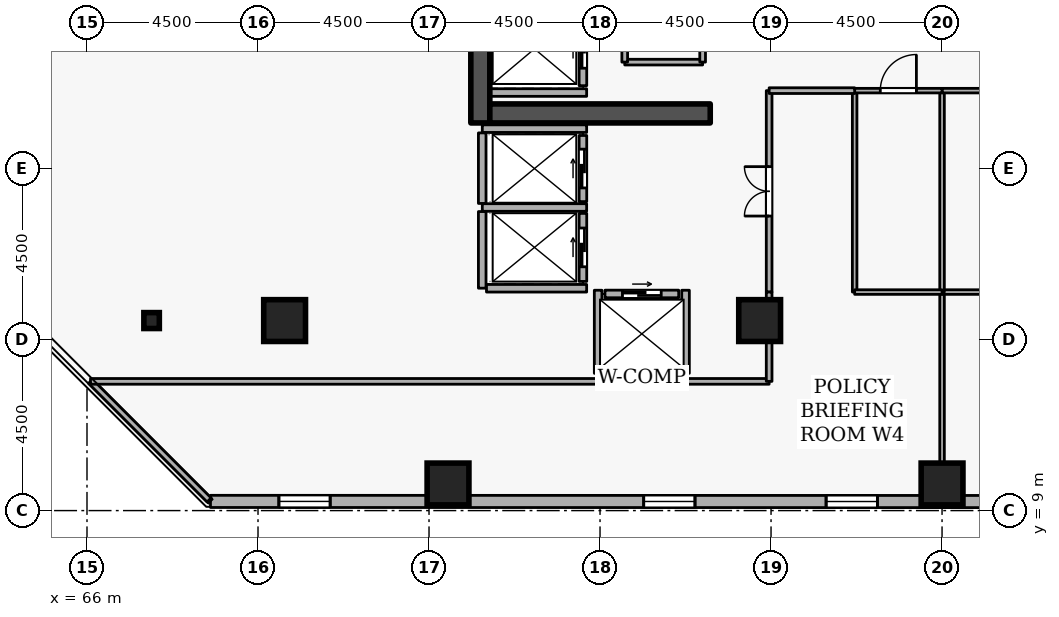
"""IFC4 building model, lengths in metres.
Left out: names, types, materials, properties, quantities, classifications, styles, units other than length and angle.
Written with IfcOpenShell. Run it as: python <this file> out.ifc"""

import sys

from ifc_helpers import new_model, si_unit, direction, frame, frame_2d, origin, origin_2d, place, context, subcontext, project, spatial, rectangle, i_section, extrude, element, fill, save


model = new_model("IFC4")
c1 = context("Model", 3, precision=1e-05, world=origin(), true_north=direction((0.0, 1.0)))
c2 = subcontext(c1, "Body", "Model", "MODEL_VIEW")
j1 = project(units=[si_unit("LENGTHUNIT", "METRE"), si_unit("PLANEANGLEUNIT", "RADIAN")], contexts=[c1])
p1 = place(None, origin())
s1 = spatial("IfcSite", under=j1, at=p1, CompositionType="ELEMENT")
p2 = place(p1, origin())
s2 = spatial("IfcBuilding", under=s1, at=p2, CompositionType="ELEMENT")
p3 = place(p2, frame((0.0, 0.0, 196.5)))
s3 = spatial("IfcBuildingStorey", under=s2, at=p3, CompositionType="ELEMENT", Elevation=196.5)
p4 = place(p3, frame((76.35, 19.2, 0.0), z_axis=(0.0, 0.0, 1.0), x_axis=(0.0, 1.0, 0.0)))
e1 = element("IfcWall", 1, at=p4, inside=s3, PredefinedType="SHEAR", context=c2, shape_type="SweptSolid", body=[
    extrude(rectangle(XDim=15.6, YDim=0.5, at=frame_2d((7.8, 0.0))), origin(), (0.0, 0.0, 1.0), 3.6),
])
p5 = place(p3, frame((76.6, 19.45, 0.0), z_axis=(0.0, 0.0, 1.0), x_axis=(1.0, 0.0, 0.0)))
e2 = element("IfcWall", 2, at=p5, inside=s3, PredefinedType="SHEAR", context=c2, shape_type="SweptSolid", body=[
    extrude(rectangle(XDim=5.8, YDim=0.5, at=frame_2d((2.9, 0.0))), origin(), (0.0, 0.0, 1.0), 3.6),
])
for number, where, z_axis, x_axis in (
    (3, (71.2, 14.0, 0.0), (0.0, 0.0, 1.0), (1.0, 0.0, 0.0)),
    (4, (88.5, 9.7, 0.0), (0.0, 0.0, 1.0), (1.0, 0.0, 0.0)),
    (5, (75.5, 9.7, 0.0), (0.0, 0.0, 1.0), (1.0, 0.0, 0.0)),
    (6, (83.7, 14.0, 0.0), (0.0, 0.0, 1.0), (1.0, 0.0, 0.0)),
):
    element("IfcColumn", number, at=place(p3, frame(where, z_axis=z_axis, x_axis=x_axis)), inside=s3, PredefinedType="COLUMN", context=c2, shape_type="SweptSolid", body=[
        extrude(rectangle(XDim=1.1, YDim=1.1, at=origin_2d()), origin(), (0.0, 0.0, 1.0), 3.6),
    ])
p6 = place(p3, frame((67.7, 14.0, 0.0), z_axis=(0.0, 0.0, 1.0), x_axis=(1.0, 0.0, 0.0)))
e7 = element("IfcColumn", 7, at=p6, inside=s3, PredefinedType="COLUMN", context=c2, shape_type="SweptSolid", body=[
    extrude(i_section(OverallWidth=0.407, OverallDepth=0.419, WebThickness=0.031, FlangeThickness=0.049, FilletRadius=0.015, at=origin_2d()), origin(), (0.0, 0.0, 1.0), 3.6),
])
p7 = place(p3, frame((69.249, 9.242, 0.0), z_axis=(0.0, 0.0, 1.0), x_axis=(0.999999983007, -0.000184351399, 0.0)))
e8 = element("IfcWall", 8, at=p7, inside=s3, PredefinedType="STANDARD", context=c2, shape_type="SweptSolid", body=[
    extrude(rectangle(XDim=34.432, YDim=0.32, at=frame_2d((17.216, 0.0))), origin(), (0.0, 0.0, 1.0), 2.22),
])
p8 = place(p7, frame((1.8, 0.0, 0.72)))
e9 = element("IfcOpeningElement", 9, at=p8, cuts=e8, PredefinedType="OPENING", context=c2, shape_type="SweptSolid", body=[
    extrude(rectangle(XDim=1.35, YDim=1.05, at=frame_2d((0.675, 0.525))), frame((0.0, 0.17, 0.0), z_axis=(0.0, -1.0, 0.0), x_axis=(1.0, 0.0, 0.0)), (0.0, 0.0, 1.0), 0.34),
])
p9 = place(p7, frame((11.4, 0.0, 0.72)))
e10 = element("IfcOpeningElement", 10, at=p9, cuts=e8, PredefinedType="OPENING", context=c2, shape_type="SweptSolid", body=[
    extrude(rectangle(XDim=1.35, YDim=1.05, at=frame_2d((0.675, 0.525))), frame((0.0, 0.17, 0.0), z_axis=(0.0, -1.0, 0.0), x_axis=(1.0, 0.0, 0.0)), (0.0, 0.0, 1.0), 0.34),
])
p10 = place(p7, frame((16.2, 0.0, 0.72)))
e11 = element("IfcOpeningElement", 11, at=p10, cuts=e8, PredefinedType="OPENING", context=c2, shape_type="SweptSolid", body=[
    extrude(rectangle(XDim=1.35, YDim=1.05, at=frame_2d((0.675, 0.525))), frame((0.0, 0.17, 0.0), z_axis=(0.0, -1.0, 0.0), x_axis=(1.0, 0.0, 0.0)), (0.0, 0.0, 1.0), 0.34),
])
p11 = place(p7, frame((21.0, 0.0, 0.72)))
e12 = element("IfcOpeningElement", 12, at=p11, cuts=e8, PredefinedType="OPENING", context=c2, shape_type="SweptSolid", body=[
    extrude(rectangle(XDim=1.35, YDim=1.05, at=frame_2d((0.675, 0.525))), frame((0.0, 0.17, 0.0), z_axis=(0.0, -1.0, 0.0), x_axis=(1.0, 0.0, 0.0)), (0.0, 0.0, 1.0), 0.34),
])
p12 = place(p7, frame((25.8, 0.0, 0.72)))
e13 = element("IfcOpeningElement", 13, at=p12, cuts=e8, PredefinedType="OPENING", context=c2, shape_type="SweptSolid", body=[
    extrude(rectangle(XDim=1.35, YDim=1.05, at=frame_2d((0.675, 0.525))), frame((0.0, 0.17, 0.0), z_axis=(0.0, -1.0, 0.0), x_axis=(1.0, 0.0, 0.0)), (0.0, 0.0, 1.0), 0.34),
])
p13 = place(p3, frame((79.05, 20.18, 0.0), z_axis=(0.0, 0.0, 1.0), x_axis=(0.0, 1.0, 0.0)))
e14 = element("IfcWall", 14, at=p13, inside=s3, PredefinedType="STANDARD", context=c2, shape_type="SweptSolid", body=[
    extrude(rectangle(XDim=1.94, YDim=0.2, at=frame_2d((0.97, 0.0))), origin(), (0.0, 0.0, 1.0), 3.32),
])
p14 = place(p13, frame((0.46, 0.0, 0.0)))
e15 = element("IfcOpeningElement", 15, at=p14, cuts=e14, PredefinedType="OPENING", context=c2, shape_type="SweptSolid", body=[
    extrude(rectangle(XDim=1.02, YDim=2.06, at=frame_2d((0.51, 1.03))), frame((0.0, 0.11, 0.0), z_axis=(0.0, -1.0, 0.0), x_axis=(1.0, 0.0, 0.0)), (0.0, 0.0, 1.0), 0.22),
])
p15 = place(p3, frame((79.05, 17.13, 0.0), z_axis=(0.0, 0.0, 1.0), x_axis=(0.0, 1.0, 0.0)))
e16 = element("IfcWall", 16, at=p15, inside=s3, PredefinedType="STANDARD", context=c2, shape_type="SweptSolid", body=[
    extrude(rectangle(XDim=1.74, YDim=0.2, at=frame_2d((0.87, 0.0))), origin(), (0.0, 0.0, 1.0), 3.32),
])
p16 = place(p15, frame((0.36, 0.0, 0.0)))
e17 = element("IfcOpeningElement", 17, at=p16, cuts=e16, PredefinedType="OPENING", context=c2, shape_type="SweptSolid", body=[
    extrude(rectangle(XDim=1.02, YDim=2.06, at=frame_2d((0.51, 1.03))), frame((0.0, 0.11, 0.0), z_axis=(0.0, -1.0, 0.0), x_axis=(1.0, 0.0, 0.0)), (0.0, 0.0, 1.0), 0.22),
])
p17 = place(p3, frame((79.05, 15.03, 0.0), z_axis=(0.0, 0.0, 1.0), x_axis=(0.0, 1.0, 0.0)))
e18 = element("IfcWall", 18, at=p17, inside=s3, PredefinedType="STANDARD", context=c2, shape_type="SweptSolid", body=[
    extrude(rectangle(XDim=1.79, YDim=0.2, at=frame_2d((0.895, 0.0))), origin(), (0.0, 0.0, 1.0), 3.32),
])
p18 = place(p17, frame((0.385, 0.0, 0.0)))
e19 = element("IfcOpeningElement", 19, at=p18, cuts=e18, PredefinedType="OPENING", context=c2, shape_type="SweptSolid", body=[
    extrude(rectangle(XDim=1.02, YDim=2.06, at=frame_2d((0.51, 1.03))), frame((0.0, 0.11, 0.0), z_axis=(0.0, -1.0, 0.0), x_axis=(1.0, 0.0, 0.0)), (0.0, 0.0, 1.0), 0.22),
])
p19 = place(p3, frame((79.63, 14.7, 0.0), z_axis=(0.0, 0.0, 1.0), x_axis=(1.0, 0.0, 0.0)))
e20 = element("IfcWall", 20, at=p19, inside=s3, PredefinedType="STANDARD", context=c2, shape_type="SweptSolid", body=[
    extrude(rectangle(XDim=1.94, YDim=0.2, at=frame_2d((0.97, 0.0))), origin(), (0.0, 0.0, 1.0), 3.32),
])
p20 = place(p19, frame((0.46, 0.0, 0.0)))
e21 = element("IfcOpeningElement", 21, at=p20, cuts=e20, PredefinedType="OPENING", context=c2, shape_type="SweptSolid", body=[
    extrude(rectangle(XDim=1.02, YDim=2.06, at=frame_2d((0.51, 1.03))), frame((0.0, 0.11, 0.0), z_axis=(0.0, -1.0, 0.0), x_axis=(1.0, 0.0, 0.0)), (0.0, 0.0, 1.0), 0.22),
])
p21 = place(p3, frame((76.612, 20.0, 0.0), z_axis=(0.0, 0.0, 1.0), x_axis=(1.0, 0.0, 0.0)))
e22 = element("IfcWall", 22, at=p21, inside=s3, PredefinedType="STANDARD", context=c2, shape_type="SweptSolid", body=[
    extrude(rectangle(XDim=2.536, YDim=0.2, at=frame_2d((1.268, 0.0))), origin(), (0.0, 0.0, 1.0), 3.32),
])
p22 = place(p3, frame((76.402, 19.05, 0.0), z_axis=(0.0, 0.0, 1.0), x_axis=(1.0, 0.0, 0.0)))
e23 = element("IfcWall", 23, at=p22, inside=s3, PredefinedType="STANDARD", context=c2, shape_type="SweptSolid", body=[
    extrude(rectangle(XDim=2.746, YDim=0.2, at=frame_2d((1.373, 0.0))), origin(), (0.0, 0.0, 1.0), 2.525),
])
p23 = place(p3, frame((76.402, 16.975, 0.0), z_axis=(0.0, 0.0, 1.0), x_axis=(1.0, 0.0, 0.0)))
e24 = element("IfcWall", 24, at=p23, inside=s3, PredefinedType="STANDARD", context=c2, shape_type="SweptSolid", body=[
    extrude(rectangle(XDim=2.746, YDim=0.2, at=frame_2d((1.373, 0.0))), origin(), (0.0, 0.0, 1.0), 3.32),
])
p24 = place(p3, frame((76.4, 14.852, 0.0), z_axis=(0.0, 0.0, 1.0), x_axis=(0.0, 1.0, 0.0)))
e25 = element("IfcWall", 25, at=p24, inside=s3, PredefinedType="STANDARD", context=c2, shape_type="SweptSolid", body=[
    extrude(rectangle(XDim=2.016, YDim=0.2, at=frame_2d((1.008, 0.0))), origin(), (0.0, 0.0, 1.0), 3.32),
])
p25 = place(p3, frame((76.4, 17.082, 0.0), z_axis=(0.0, 0.0, 1.0), x_axis=(0.0, 1.0, 0.0)))
e26 = element("IfcWall", 26, at=p25, inside=s3, PredefinedType="STANDARD", context=c2, shape_type="SweptSolid", body=[
    extrude(rectangle(XDim=1.856, YDim=0.2, at=frame_2d((0.928, 0.0))), origin(), (0.0, 0.0, 1.0), 3.32),
])
p26 = place(p3, frame((76.512, 14.85, 0.0), z_axis=(0.0, 0.0, 1.0), x_axis=(1.0, 0.0, 0.0)))
e27 = element("IfcWall", 27, at=p26, inside=s3, PredefinedType="STANDARD", context=c2, shape_type="SweptSolid", body=[
    extrude(rectangle(XDim=2.636, YDim=0.2, at=frame_2d((1.318, 0.0))), origin(), (0.0, 0.0, 1.0), 3.32),
])
p27 = place(p3, frame((79.452, 12.5, 0.0), z_axis=(0.0, 0.0, 1.0), x_axis=(1.0, 0.0, 0.0)))
e28 = element("IfcWall", 28, at=p27, inside=s3, PredefinedType="STANDARD", context=c2, shape_type="SweptSolid", body=[
    extrude(rectangle(XDim=2.296, YDim=0.2, at=frame_2d((1.148, 0.0))), origin(), (0.0, 0.0, 1.0), 3.32),
])
for number, where, z_axis, x_axis in (
    (29, (81.75, 12.612, 0.0), (0.0, 0.0, 1.0), (0.0, 1.0, 0.0)),
    (30, (79.45, 12.612, 0.0), (0.0, 0.0, 1.0), (0.0, 1.0, 0.0)),
):
    element("IfcWall", number, at=place(p3, frame(where, z_axis=z_axis, x_axis=x_axis)), inside=s3, PredefinedType="STANDARD", context=c2, shape_type="SweptSolid", body=[
        extrude(rectangle(XDim=2.186, YDim=0.2, at=frame_2d((1.093, 0.0))), origin(), (0.0, 0.0, 1.0), 3.32),
    ])
p28 = place(p3, frame((82.2, 20.8, 0.0), z_axis=(0.0, 0.0, 1.0), x_axis=(-1.0, 0.0, 0.0)))
e31 = element("IfcWall", 31, at=p28, inside=s3, PredefinedType="PARTITIONING", context=c2, shape_type="SweptSolid", body=[
    extrude(rectangle(XDim=2.05, YDim=0.15, at=frame_2d((1.025, 0.0))), origin(), (0.0, 0.0, 1.0), 3.32),
])
p29 = place(p3, frame((80.15, 20.8, 0.0), z_axis=(0.0, 0.0, 1.0), x_axis=(0.0, 1.0, 0.0)))
e32 = element("IfcWall", 32, at=p29, inside=s3, PredefinedType="PARTITIONING", context=c2, shape_type="SweptSolid", body=[
    extrude(rectangle(XDim=3.25, YDim=0.15, at=frame_2d((1.625, 0.0))), origin(), (0.0, 0.0, 1.0), 3.32),
])
p30 = place(p3, frame((82.2, 24.05, 0.0), z_axis=(0.0, 0.0, 1.0), x_axis=(0.0, -1.0, 0.0)))
e33 = element("IfcWall", 33, at=p30, inside=s3, PredefinedType="PARTITIONING", context=c2, shape_type="SweptSolid", body=[
    extrude(rectangle(XDim=3.25, YDim=0.15, at=frame_2d((1.625, 0.0))), origin(), (0.0, 0.0, 1.0), 3.32),
])
p31 = place(p30, frame((1.165, 0.0, 0.0)))
e34 = element("IfcOpeningElement", 34, at=p31, cuts=e33, PredefinedType="OPENING", context=c2, shape_type="SweptSolid", body=[
    extrude(rectangle(XDim=0.92, YDim=2.08, at=frame_2d((0.46, 1.04))), frame((0.0, 0.085, 0.0), z_axis=(0.0, -1.0, 0.0), x_axis=(1.0, 0.0, 0.0)), (0.0, 0.0, 1.0), 0.17),
])
p32 = place(p3, frame((88.5, 9.28, 0.0), z_axis=(0.0, 0.0, 1.0), x_axis=(0.0, 1.0, 0.0)))
e35 = element("IfcWall", 35, at=p32, inside=s3, PredefinedType="PARTITIONING", context=c2, shape_type="SweptSolid", body=[
    extrude(rectangle(XDim=5.47, YDim=0.12, at=frame_2d((2.735, 0.0))), origin(), (0.0, 0.0, 1.0), 1.785),
])
p33 = place(p3, frame((88.5, 14.75, 0.0), z_axis=(0.0, 0.0, 1.0), x_axis=(1.0, 0.0, 0.0)))
e36 = element("IfcWall", 36, at=p33, inside=s3, PredefinedType="PARTITIONING", context=c2, shape_type="SweptSolid", body=[
    extrude(rectangle(XDim=4.55, YDim=0.12, at=frame_2d((2.275, 0.0))), origin(), (0.0, 0.0, 1.0), 3.32),
])
p34 = place(p3, frame((88.5, 14.75, 0.0), z_axis=(0.0, 0.0, 1.0), x_axis=(0.0, 1.0, 0.0)))
e37 = element("IfcWall", 37, at=p34, inside=s3, PredefinedType="PARTITIONING", context=c2, shape_type="SweptSolid", body=[
    extrude(rectangle(XDim=5.3, YDim=0.12, at=frame_2d((2.65, 0.0))), origin(), (0.0, 0.0, 1.0), 1.785),
])
p35 = place(p3, frame((88.5, 20.05, 0.0), z_axis=(0.0, 0.0, 1.0), x_axis=(1.0, 0.0, 0.0)))
e38 = element("IfcWall", 38, at=p35, inside=s3, PredefinedType="PARTITIONING", context=c2, shape_type="SweptSolid", body=[
    extrude(rectangle(XDim=4.55, YDim=0.12, at=frame_2d((2.275, 0.0))), origin(), (0.0, 0.0, 1.0), 3.32),
])
p36 = place(p3, frame((86.2, 14.75, 0.0), z_axis=(0.0, 0.0, 1.0), x_axis=(0.0, 1.0, 0.0)))
e39 = element("IfcWall", 39, at=p36, inside=s3, PredefinedType="PARTITIONING", context=c2, shape_type="SweptSolid", body=[
    extrude(rectangle(XDim=5.3, YDim=0.12, at=frame_2d((2.65, 0.0))), origin(), (0.0, 0.0, 1.0), 3.32),
])
p37 = place(p3, frame((86.2, 20.05, 0.0), z_axis=(0.0, 0.0, 1.0), x_axis=(1.0, 0.0, 0.0)))
e40 = element("IfcWall", 40, at=p37, inside=s3, PredefinedType="PARTITIONING", context=c2, shape_type="SweptSolid", body=[
    extrude(rectangle(XDim=2.3, YDim=0.12, at=frame_2d((1.15, 0.0))), origin(), (0.0, 0.0, 1.0), 3.32),
])
p38 = place(p37, frame((0.675, 0.0, 0.0)))
e41 = element("IfcOpeningElement", 41, at=p38, cuts=e40, PredefinedType="OPENING", context=c2, shape_type="SweptSolid", body=[
    extrude(rectangle(XDim=0.95, YDim=2.1, at=frame_2d((0.475, 1.05))), frame((0.0, 0.07, 0.0), z_axis=(0.0, -1.0, 0.0), x_axis=(1.0, 0.0, 0.0)), (0.0, 0.0, 1.0), 0.14),
])
p39 = place(p3, frame((88.5, 14.75, 0.0), z_axis=(0.0, 0.0, 1.0), x_axis=(-1.0, 0.0, 0.0)))
e42 = element("IfcWall", 42, at=p39, inside=s3, PredefinedType="PARTITIONING", context=c2, shape_type="SweptSolid", body=[
    extrude(rectangle(XDim=2.3, YDim=0.12, at=frame_2d((1.15, 0.0))), origin(), (0.0, 0.0, 1.0), 3.32),
])
p40 = place(p3, frame((83.95, 14.75, 0.0), z_axis=(0.0, 0.0, 1.0), x_axis=(0.0, 1.0, 0.0)))
e43 = element("IfcWall", 43, at=p40, inside=s3, PredefinedType="PARTITIONING", context=c2, shape_type="SweptSolid", body=[
    extrude(rectangle(XDim=5.3, YDim=0.15, at=frame_2d((2.65, 0.0))), origin(), (0.0, 0.0, 1.0), 3.32),
])
p41 = place(p40, frame((2.0, 0.0, 0.0)))
e44 = element("IfcOpeningElement", 44, at=p41, cuts=e43, PredefinedType="OPENING", context=c2, shape_type="SweptSolid", body=[
    extrude(rectangle(XDim=1.3, YDim=2.12, at=frame_2d((0.65, 1.06))), frame((0.0, 0.085, 0.0), z_axis=(0.0, -1.0, 0.0), x_axis=(1.0, 0.0, 0.0)), (0.0, 0.0, 1.0), 0.17),
])
p42 = place(p3, frame((83.95, 20.05, 0.0), z_axis=(0.0, 0.0, 1.0), x_axis=(1.0, 0.0, 0.0)))
e45 = element("IfcWall", 45, at=p42, inside=s3, PredefinedType="PARTITIONING", context=c2, shape_type="SweptSolid", body=[
    extrude(rectangle(XDim=2.25, YDim=0.15, at=frame_2d((1.125, 0.0))), origin(), (0.0, 0.0, 1.0), 3.32),
])
p43 = place(p3, frame((69.213, 9.28, 0.0), z_axis=(0.0, 0.0, 1.0), x_axis=(-0.707134446312, 0.707079114978, 0.0)))
e46 = element("IfcWall", 46, at=p43, inside=s3, PredefinedType="PARTITIONING", context=c2, shape_type="SweptSolid", body=[
    extrude(rectangle(XDim=4.412, YDim=0.15, at=frame_2d((2.206, 0.0))), origin(), (0.0, 0.0, 1.0), 3.32),
])
p44 = place(p3, frame((66.093, 12.4, 0.0), z_axis=(0.0, 0.0, 1.0), x_axis=(1.0, 0.0, 0.0)))
e47 = element("IfcWall", 47, at=p44, inside=s3, PredefinedType="PARTITIONING", context=c2, shape_type="SweptSolid", body=[
    extrude(rectangle(XDim=13.359, YDim=0.15, at=frame_2d((6.68, 0.0))), origin(), (0.0, 0.0, 1.0), 3.32),
])
p45 = place(p3, frame((81.748, 12.4, 0.0), z_axis=(0.0, 0.0, 1.0), x_axis=(1.0, 0.0, 0.0)))
e48 = element("IfcWall", 48, at=p45, inside=s3, PredefinedType="PARTITIONING", context=c2, shape_type="SweptSolid", body=[
    extrude(rectangle(XDim=2.202, YDim=0.15, at=frame_2d((1.101, 0.0))), origin(), (0.0, 0.0, 1.0), 3.32),
])
p46 = place(p3, frame((83.95, 12.4, 0.0), z_axis=(0.0, 0.0, 1.0), x_axis=(0.0, 1.0, 0.0)))
e49 = element("IfcWall", 49, at=p46, inside=s3, PredefinedType="PARTITIONING", context=c2, shape_type="SweptSolid", body=[
    extrude(rectangle(XDim=2.35, YDim=0.15, at=frame_2d((1.175, 0.0))), origin(), (0.0, 0.0, 1.0), 3.32),
])
p47 = place(p8, origin())
e50 = element("IfcWindow", 50, at=p47, inside=s3, PartitioningType="SINGLE_PANEL", PredefinedType="WINDOW", context=c2, shape_type="SweptSolid", body=[
    extrude(rectangle(XDim=1.35, YDim=1.05, at=frame_2d((0.675, 0.525))), frame((0.0, 0.03, 0.0), z_axis=(0.0, -1.0, 0.0), x_axis=(1.0, 0.0, 0.0)), (0.0, 0.0, 1.0), 0.06),
])
fill(e9, e50)
p48 = place(p9, origin())
e51 = element("IfcWindow", 51, at=p48, inside=s3, PartitioningType="SINGLE_PANEL", PredefinedType="WINDOW", context=c2, shape_type="SweptSolid", body=[
    extrude(rectangle(XDim=1.35, YDim=1.05, at=frame_2d((0.675, 0.525))), frame((0.0, 0.03, 0.0), z_axis=(0.0, -1.0, 0.0), x_axis=(1.0, 0.0, 0.0)), (0.0, 0.0, 1.0), 0.06),
])
fill(e10, e51)
p49 = place(p10, origin())
e52 = element("IfcWindow", 52, at=p49, inside=s3, PartitioningType="SINGLE_PANEL", PredefinedType="WINDOW", context=c2, shape_type="SweptSolid", body=[
    extrude(rectangle(XDim=1.35, YDim=1.05, at=frame_2d((0.675, 0.525))), frame((0.0, 0.03, 0.0), z_axis=(0.0, -1.0, 0.0), x_axis=(1.0, 0.0, 0.0)), (0.0, 0.0, 1.0), 0.06),
])
fill(e11, e52)
p50 = place(p14, origin())
e53 = element("IfcDoor", 53, at=p50, inside=s3, OperationType="SLIDING_TO_LEFT", PredefinedType="DOOR", context=c2, shape_type="SweptSolid", body=[
    extrude(rectangle(XDim=1.02, YDim=2.06, at=frame_2d((0.51, 1.03))), frame((0.0, 0.025, 0.0), z_axis=(0.0, -1.0, 0.0), x_axis=(1.0, 0.0, 0.0)), (0.0, 0.0, 1.0), 0.05),
])
fill(e15, e53)
p51 = place(p16, origin())
e54 = element("IfcDoor", 54, at=p51, inside=s3, OperationType="SLIDING_TO_LEFT", PredefinedType="DOOR", context=c2, shape_type="SweptSolid", body=[
    extrude(rectangle(XDim=1.02, YDim=2.06, at=frame_2d((0.51, 1.03))), frame((0.0, 0.025, 0.0), z_axis=(0.0, -1.0, 0.0), x_axis=(1.0, 0.0, 0.0)), (0.0, 0.0, 1.0), 0.05),
])
fill(e17, e54)
p52 = place(p18, origin())
e55 = element("IfcDoor", 55, at=p52, inside=s3, OperationType="SLIDING_TO_LEFT", PredefinedType="DOOR", context=c2, shape_type="SweptSolid", body=[
    extrude(rectangle(XDim=1.02, YDim=2.06, at=frame_2d((0.51, 1.03))), frame((0.0, 0.025, 0.0), z_axis=(0.0, -1.0, 0.0), x_axis=(1.0, 0.0, 0.0)), (0.0, 0.0, 1.0), 0.05),
])
fill(e19, e55)
p53 = place(p20, origin())
e56 = element("IfcDoor", 56, at=p53, inside=s3, OperationType="SLIDING_TO_LEFT", PredefinedType="DOOR", context=c2, shape_type="SweptSolid", body=[
    extrude(rectangle(XDim=1.02, YDim=2.06, at=frame_2d((0.51, 1.03))), frame((0.0, 0.025, 0.0), z_axis=(0.0, -1.0, 0.0), x_axis=(1.0, 0.0, 0.0)), (0.0, 0.0, 1.0), 0.05),
])
fill(e21, e56)
p54 = place(p38, origin())
e57 = element("IfcDoor", 57, at=p54, inside=s3, OperationType="SINGLE_SWING_RIGHT", PredefinedType="DOOR", context=c2, shape_type="SweptSolid", body=[
    extrude(rectangle(XDim=0.95, YDim=2.1, at=frame_2d((0.475, 1.05))), frame((0.0, 0.025, 0.0), z_axis=(0.0, -1.0, 0.0), x_axis=(1.0, 0.0, 0.0)), (0.0, 0.0, 1.0), 0.05),
])
fill(e41, e57)
p55 = place(p41, origin())
e58 = element("IfcDoor", 58, at=p55, inside=s3, OperationType="DOUBLE_DOOR_SINGLE_SWING", PredefinedType="DOOR", context=c2, shape_type="SweptSolid", body=[
    extrude(rectangle(XDim=1.3, YDim=2.12, at=frame_2d((0.65, 1.06))), frame((0.0, 0.025, 0.0), z_axis=(0.0, -1.0, 0.0), x_axis=(1.0, 0.0, 0.0)), (0.0, 0.0, 1.0), 0.05),
])
fill(e44, e58)
save(model, sys.argv[1])
